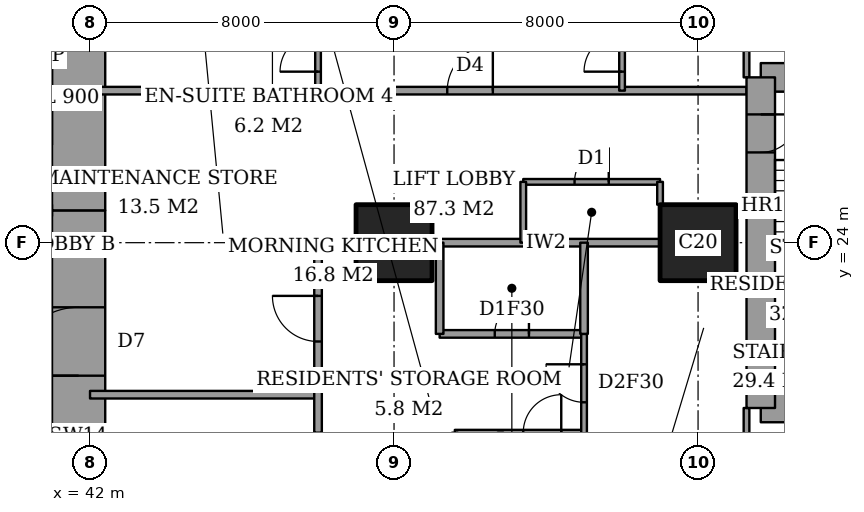
"""IFC4 building model, lengths in metres.
Left out: names, types, materials, properties, quantities, classifications, styles, units other than length and angle.
Written with IfcOpenShell. Run it as: python <this file> out.ifc"""

import sys

from ifc_helpers import new_model, si_unit, direction, frame, frame_2d, origin, origin_2d, place, context, subcontext, project, spatial, rectangle, extrude, element, fill, save


model = new_model("IFC4")
c1 = context("Model", 3, precision=1e-05, world=origin(), true_north=direction((0.0, 1.0)))
c2 = subcontext(c1, "Body", "Model", "MODEL_VIEW")
j1 = project(units=[si_unit("LENGTHUNIT", "METRE"), si_unit("PLANEANGLEUNIT", "RADIAN")], contexts=[c1])
p1 = place(None, origin())
s1 = spatial("IfcSite", under=j1, at=p1, CompositionType="ELEMENT")
p2 = place(p1, origin())
s2 = spatial("IfcBuilding", under=s1, at=p2, CompositionType="ELEMENT")
p3 = place(p2, frame((0.0, 0.0, 146.6)))
s3 = spatial("IfcBuildingStorey", under=s2, at=p3, CompositionType="ELEMENT", Elevation=146.6)
for number, where, z_axis, x_axis in (
    (1, (50.0, 24.0, 0.0), (0.0, 0.0, 1.0), (1.0, 0.0, 0.0)),
    (2, (58.0, 24.0, 0.0), (0.0, 0.0, 1.0), (1.0, 0.0, 0.0)),
):
    element("IfcColumn", number, at=place(p3, frame(where, z_axis=z_axis, x_axis=x_axis)), inside=s3, PredefinedType="COLUMN", context=c2, shape_type="SweptSolid", body=[
        extrude(rectangle(XDim=2.0, YDim=2.0, at=origin_2d()), origin(), (0.0, 0.0, 1.0), 3.6),
    ])
p4 = place(p3, frame((41.7, 13.0, 0.0), z_axis=(0.0, 0.0, 1.0), x_axis=(0.0, 1.0, 0.0)))
e3 = element("IfcWall", 3, at=p4, inside=s3, PredefinedType="SHEAR", context=c2, shape_type="SweptSolid", body=[
    extrude(rectangle(XDim=11.85, YDim=1.4, at=frame_2d((5.925, 0.0))), origin(), (0.0, 0.0, 1.0), 3.6),
])
p5 = place(p4, frame((7.5, 0.0, 0.0)))
e4 = element("IfcOpeningElement", 4, at=p5, cuts=e3, PredefinedType="OPENING", context=c2, shape_type="SweptSolid", body=[
    extrude(rectangle(XDim=1.8, YDim=2.4, at=frame_2d((0.9, 1.2))), frame((0.0, 0.71, 0.0), z_axis=(0.0, -1.0, 0.0), x_axis=(1.0, 0.0, 0.0)), (0.0, 0.0, 1.0), 1.42),
])
p6 = place(p3, frame((41.7, 24.85, 0.0), z_axis=(0.0, 0.0, 1.0), x_axis=(0.0, 1.0, 0.0)))
e5 = element("IfcWall", 5, at=p6, inside=s3, PredefinedType="SHEAR", context=c2, shape_type="SweptSolid", body=[
    extrude(rectangle(XDim=10.15, YDim=1.4, at=frame_2d((5.075, 0.0))), origin(), (0.0, 0.0, 1.0), 3.6),
])
for number, where, z_axis, x_axis in (
    (6, (59.65, 19.65, 0.0), (0.0, 0.0, 1.0), (1.0, 0.0, 0.0)),
    (7, (64.1, 28.35, 0.0), (0.0, 0.0, 1.0), (-1.0, 0.0, 0.0)),
):
    element("IfcWall", number, at=place(p3, frame(where, z_axis=z_axis, x_axis=x_axis)), inside=s3, PredefinedType="SHEAR", context=c2, shape_type="SweptSolid", body=[
        extrude(rectangle(XDim=4.45, YDim=0.75, at=frame_2d((2.225, 0.0))), origin(), (0.0, 0.0, 1.0), 3.6),
    ])
p7 = place(p3, frame((59.65, 28.35, 0.0), z_axis=(0.0, 0.0, 1.0), x_axis=(0.0, -1.0, 0.0)))
e8 = element("IfcWall", 8, at=p7, inside=s3, PredefinedType="SHEAR", context=c2, shape_type="SweptSolid", body=[
    extrude(rectangle(XDim=8.7, YDim=0.75, at=frame_2d((4.35, 0.0))), origin(), (0.0, 0.0, 1.0), 3.6),
])
p8 = place(p7, frame((0.975, 0.0, 0.0)))
e9 = element("IfcOpeningElement", 9, at=p8, cuts=e8, PredefinedType="OPENING", context=c2, shape_type="SweptSolid", body=[
    extrude(rectangle(XDim=1.0, YDim=2.1, at=frame_2d((0.5, 1.05))), frame((0.0, 0.385, 0.0), z_axis=(0.0, -1.0, 0.0), x_axis=(1.0, 0.0, 0.0)), (0.0, 0.0, 1.0), 0.77),
])
p9 = place(p3, frame((51.6, 19.0, 0.0), z_axis=(0.0, 0.0, 1.0), x_axis=(1.0, 0.0, 0.0)))
e10 = element("IfcWall", 10, at=p9, inside=s3, PredefinedType="PARTITIONING", context=c2, shape_type="SweptSolid", body=[
    extrude(rectangle(XDim=3.4, YDim=0.15, at=frame_2d((1.7, 0.0))), origin(), (0.0, 0.0, 1.0), 3.35),
])
p10 = place(p9, frame((1.8, 0.0, 0.0)))
e11 = element("IfcOpeningElement", 11, at=p10, cuts=e10, PredefinedType="OPENING", context=c2, shape_type="SweptSolid", body=[
    extrude(rectangle(XDim=1.0, YDim=2.1, at=frame_2d((0.5, 1.05))), frame((0.0, 0.085, 0.0), z_axis=(0.0, -1.0, 0.0), x_axis=(1.0, 0.0, 0.0)), (0.0, 0.0, 1.0), 0.17),
])
p11 = place(p3, frame((42.0, 20.0, 0.0), z_axis=(0.0, 0.0, 1.0), x_axis=(1.0, 0.0, 0.0)))
e12 = element("IfcWall", 12, at=p11, inside=s3, PredefinedType="PARTITIONING", context=c2, shape_type="SweptSolid", body=[
    extrude(rectangle(XDim=6.0, YDim=0.2, at=frame_2d((3.0, 0.0))), origin(), (0.0, 0.0, 1.0), 3.35),
])
p12 = place(p3, frame((51.2, 21.6, 0.0), z_axis=(0.0, 0.0, 1.0), x_axis=(1.0, 0.0, 0.0)))
e13 = element("IfcWall", 13, at=p12, inside=s3, PredefinedType="PARTITIONING", context=c2, shape_type="SweptSolid", body=[
    extrude(rectangle(XDim=3.8, YDim=0.2, at=frame_2d((1.9, 0.0))), origin(), (0.0, 0.0, 1.0), 3.35),
])
p13 = place(p12, frame((1.45, 0.0, 0.0)))
e14 = element("IfcOpeningElement", 14, at=p13, cuts=e13, PredefinedType="OPENING", context=c2, shape_type="SweptSolid", body=[
    extrude(rectangle(XDim=0.9, YDim=2.1, at=frame_2d((0.45, 1.05))), frame((0.0, 0.11, 0.0), z_axis=(0.0, -1.0, 0.0), x_axis=(1.0, 0.0, 0.0)), (0.0, 0.0, 1.0), 0.22),
])
p14 = place(p3, frame((48.0, 24.0, 0.0), z_axis=(0.0, 0.0, 1.0), x_axis=(1.0, 0.0, 0.0)))
e15 = element("IfcWall", 15, at=p14, inside=s3, PredefinedType="PARTITIONING", context=c2, shape_type="SweptSolid", body=[
    extrude(rectangle(XDim=1.0, YDim=0.2, at=frame_2d((0.5, 0.0))), origin(), (0.0, 0.0, 1.0), 3.35),
])
p15 = place(p3, frame((51.0, 24.0, 0.0), z_axis=(0.0, 0.0, 1.0), x_axis=(1.0, 0.0, 0.0)))
e16 = element("IfcWall", 16, at=p15, inside=s3, PredefinedType="PARTITIONING", context=c2, shape_type="SweptSolid", body=[
    extrude(rectangle(XDim=6.0, YDim=0.2, at=frame_2d((3.0, 0.0))), origin(), (0.0, 0.0, 1.0), 3.35),
])
p16 = place(p3, frame((53.4, 25.6, 0.0), z_axis=(0.0, 0.0, 1.0), x_axis=(1.0, 0.0, 0.0)))
e17 = element("IfcWall", 17, at=p16, inside=s3, PredefinedType="PARTITIONING", context=c2, shape_type="SweptSolid", body=[
    extrude(rectangle(XDim=3.6, YDim=0.15, at=frame_2d((1.8, 0.0))), origin(), (0.0, 0.0, 1.0), 3.35),
])
p17 = place(p16, frame((1.35, 0.0, 0.0)))
e18 = element("IfcOpeningElement", 18, at=p17, cuts=e17, PredefinedType="OPENING", context=c2, shape_type="SweptSolid", body=[
    extrude(rectangle(XDim=0.9, YDim=2.1, at=frame_2d((0.45, 1.05))), frame((0.0, 0.085, 0.0), z_axis=(0.0, -1.0, 0.0), x_axis=(1.0, 0.0, 0.0)), (0.0, 0.0, 1.0), 0.17),
])
p18 = place(p3, frame((42.0, 28.0, 0.0), z_axis=(0.0, 0.0, 1.0), x_axis=(1.0, 0.0, 0.0)))
e19 = element("IfcWall", 19, at=p18, inside=s3, PredefinedType="PARTITIONING", context=c2, shape_type="SweptSolid", body=[
    extrude(rectangle(XDim=17.275, YDim=0.2, at=frame_2d((8.637, 0.0))), origin(), (0.0, 0.0, 1.0), 3.35),
])
p19 = place(p18, frame((9.4, 0.0, 0.0)))
e20 = element("IfcOpeningElement", 20, at=p19, cuts=e19, PredefinedType="OPENING", context=c2, shape_type="SweptSolid", body=[
    extrude(rectangle(XDim=1.2, YDim=2.4, at=frame_2d((0.6, 1.2))), frame((0.0, 0.11, 0.0), z_axis=(0.0, -1.0, 0.0), x_axis=(1.0, 0.0, 0.0)), (0.0, 0.0, 1.0), 0.22),
])
p20 = place(p3, frame((48.0, 19.0, 0.0), z_axis=(0.0, 0.0, 1.0), x_axis=(0.0, 1.0, 0.0)))
e21 = element("IfcWall", 21, at=p20, inside=s3, PredefinedType="PARTITIONING", context=c2, shape_type="SweptSolid", body=[
    extrude(rectangle(XDim=5.0, YDim=0.2, at=frame_2d((2.5, 0.0))), origin(), (0.0, 0.0, 1.0), 3.35),
])
p21 = place(p20, frame((2.4, 0.0, 0.0)))
e22 = element("IfcOpeningElement", 22, at=p21, cuts=e21, PredefinedType="OPENING", context=c2, shape_type="SweptSolid", body=[
    extrude(rectangle(XDim=1.2, YDim=2.4, at=frame_2d((0.6, 1.2))), frame((0.0, 0.11, 0.0), z_axis=(0.0, -1.0, 0.0), x_axis=(1.0, 0.0, 0.0)), (0.0, 0.0, 1.0), 0.22),
])
p22 = place(p3, frame((48.0, 28.0, 0.0), z_axis=(0.0, 0.0, 1.0), x_axis=(0.0, 1.0, 0.0)))
e23 = element("IfcWall", 23, at=p22, inside=s3, PredefinedType="PARTITIONING", context=c2, shape_type="SweptSolid", body=[
    extrude(rectangle(XDim=9.2, YDim=0.15, at=frame_2d((4.6, 0.0))), origin(), (0.0, 0.0, 1.0), 3.35),
])
p23 = place(p22, frame((0.5, 0.0, 0.0)))
e24 = element("IfcOpeningElement", 24, at=p23, cuts=e23, PredefinedType="OPENING", context=c2, shape_type="SweptSolid", body=[
    extrude(rectangle(XDim=1.0, YDim=2.1, at=frame_2d((0.5, 1.05))), frame((0.0, 0.085, 0.0), z_axis=(0.0, -1.0, 0.0), x_axis=(1.0, 0.0, 0.0)), (0.0, 0.0, 1.0), 0.17),
])
p24 = place(p3, frame((51.2, 21.6, 0.0), z_axis=(0.0, 0.0, 1.0), x_axis=(0.0, 1.0, 0.0)))
e25 = element("IfcWall", 25, at=p24, inside=s3, PredefinedType="PARTITIONING", context=c2, shape_type="SweptSolid", body=[
    extrude(rectangle(XDim=2.4, YDim=0.2, at=frame_2d((1.2, 0.0))), origin(), (0.0, 0.0, 1.0), 3.35),
])
p25 = place(p3, frame((51.6, 16.05, 0.0), z_axis=(0.0, 0.0, 1.0), x_axis=(0.0, 1.0, 0.0)))
e26 = element("IfcWall", 26, at=p25, inside=s3, PredefinedType="PARTITIONING", context=c2, shape_type="SweptSolid", body=[
    extrude(rectangle(XDim=2.95, YDim=0.15, at=frame_2d((1.475, 0.0))), origin(), (0.0, 0.0, 1.0), 3.35),
])
p26 = place(p3, frame((53.4, 24.0, 0.0), z_axis=(0.0, 0.0, 1.0), x_axis=(0.0, 1.0, 0.0)))
e27 = element("IfcWall", 27, at=p26, inside=s3, PredefinedType="PARTITIONING", context=c2, shape_type="SweptSolid", body=[
    extrude(rectangle(XDim=1.6, YDim=0.15, at=frame_2d((0.8, 0.0))), origin(), (0.0, 0.0, 1.0), 3.35),
])
p27 = place(p3, frame((55.0, 21.6, 0.0), z_axis=(0.0, 0.0, 1.0), x_axis=(0.0, 1.0, 0.0)))
e28 = element("IfcWall", 28, at=p27, inside=s3, PredefinedType="PARTITIONING", context=c2, shape_type="SweptSolid", body=[
    extrude(rectangle(XDim=2.4, YDim=0.2, at=frame_2d((1.2, 0.0))), origin(), (0.0, 0.0, 1.0), 3.35),
])
p28 = place(p3, frame((55.0, 10.6, 0.0), z_axis=(0.0, 0.0, 1.0), x_axis=(0.0, 1.0, 0.0)))
e29 = element("IfcWall", 29, at=p28, inside=s3, PredefinedType="PARTITIONING", context=c2, shape_type="SweptSolid", body=[
    extrude(rectangle(XDim=11.0, YDim=0.15, at=frame_2d((5.5, 0.0))), origin(), (0.0, 0.0, 1.0), 3.35),
])
p29 = place(p28, frame((9.2, 0.0, 0.0)))
e30 = element("IfcOpeningElement", 30, at=p29, cuts=e29, PredefinedType="OPENING", context=c2, shape_type="SweptSolid", body=[
    extrude(rectangle(XDim=1.0, YDim=2.1, at=frame_2d((0.5, 1.05))), frame((0.0, 0.085, 0.0), z_axis=(0.0, -1.0, 0.0), x_axis=(1.0, 0.0, 0.0)), (0.0, 0.0, 1.0), 0.17),
])
p30 = place(p3, frame((56.0, 28.0, 0.0), z_axis=(0.0, 0.0, 1.0), x_axis=(0.0, 1.0, 0.0)))
e31 = element("IfcWall", 31, at=p30, inside=s3, PredefinedType="PARTITIONING", context=c2, shape_type="SweptSolid", body=[
    extrude(rectangle(XDim=9.2, YDim=0.15, at=frame_2d((4.6, 0.0))), origin(), (0.0, 0.0, 1.0), 3.35),
])
p31 = place(p30, frame((0.5, 0.0, 0.0)))
e32 = element("IfcOpeningElement", 32, at=p31, cuts=e31, PredefinedType="OPENING", context=c2, shape_type="SweptSolid", body=[
    extrude(rectangle(XDim=1.0, YDim=2.1, at=frame_2d((0.5, 1.05))), frame((0.0, 0.085, 0.0), z_axis=(0.0, -1.0, 0.0), x_axis=(1.0, 0.0, 0.0)), (0.0, 0.0, 1.0), 0.17),
])
p32 = place(p3, frame((57.0, 25.0, 0.0), z_axis=(0.0, 0.0, 1.0), x_axis=(0.0, 1.0, 0.0)))
e33 = element("IfcWall", 33, at=p32, inside=s3, PredefinedType="PARTITIONING", context=c2, shape_type="SweptSolid", body=[
    extrude(rectangle(XDim=0.6, YDim=0.15, at=frame_2d((0.3, 0.0))), origin(), (0.0, 0.0, 1.0), 3.35),
])
p33 = place(p3, frame((59.275, 17.2, 0.0), z_axis=(0.0, 0.0, 1.0), x_axis=(0.0, 1.0, 0.0)))
e34 = element("IfcWall", 34, at=p33, inside=s3, PredefinedType="PARTITIONING", context=c2, shape_type="SweptSolid", body=[
    extrude(rectangle(XDim=2.45, YDim=0.15, at=frame_2d((1.225, 0.0))), origin(), (0.0, 0.0, 1.0), 3.35),
])
p34 = place(p33, frame((0.538, 0.0, 0.0)))
e35 = element("IfcOpeningElement", 35, at=p34, cuts=e34, PredefinedType="OPENING", context=c2, shape_type="SweptSolid", body=[
    extrude(rectangle(XDim=1.0, YDim=2.1, at=frame_2d((0.5, 1.05))), frame((0.0, 0.085, 0.0), z_axis=(0.0, -1.0, 0.0), x_axis=(1.0, 0.0, 0.0)), (0.0, 0.0, 1.0), 0.17),
])
p35 = place(p3, frame((59.275, 28.35, 0.0), z_axis=(0.0, 0.0, 1.0), x_axis=(0.0, 1.0, 0.0)))
e36 = element("IfcWall", 36, at=p35, inside=s3, PredefinedType="PARTITIONING", context=c2, shape_type="SweptSolid", body=[
    extrude(rectangle(XDim=2.45, YDim=0.15, at=frame_2d((1.225, 0.0))), origin(), (0.0, 0.0, 1.0), 3.35),
])
p36 = place(p35, frame((0.913, 0.0, 0.0)))
e37 = element("IfcOpeningElement", 37, at=p36, cuts=e36, PredefinedType="OPENING", context=c2, shape_type="SweptSolid", body=[
    extrude(rectangle(XDim=1.0, YDim=2.1, at=frame_2d((0.5, 1.05))), frame((0.0, 0.085, 0.0), z_axis=(0.0, -1.0, 0.0), x_axis=(1.0, 0.0, 0.0)), (0.0, 0.0, 1.0), 0.17),
])
p37 = place(p29, origin())
e38 = element("IfcDoor", 38, at=p37, inside=s3, OperationType="SINGLE_SWING_LEFT", PredefinedType="DOOR", context=c2, shape_type="SweptSolid", body=[
    extrude(rectangle(XDim=1.0, YDim=2.1, at=frame_2d((0.5, 1.05))), frame((0.0, 0.025, 0.0), z_axis=(0.0, -1.0, 0.0), x_axis=(1.0, 0.0, 0.0)), (0.0, 0.0, 1.0), 0.05),
])
fill(e30, e38)
p38 = place(p13, origin())
e39 = element("IfcDoor", 39, at=p38, inside=s3, OperationType="SINGLE_SWING_LEFT", PredefinedType="DOOR", context=c2, shape_type="SweptSolid", body=[
    extrude(rectangle(XDim=0.9, YDim=2.1, at=frame_2d((0.45, 1.05))), frame((0.0, 0.025, 0.0), z_axis=(0.0, -1.0, 0.0), x_axis=(1.0, 0.0, 0.0)), (0.0, 0.0, 1.0), 0.05),
])
fill(e14, e39)
p39 = place(p21, origin())
e40 = element("IfcDoor", 40, at=p39, inside=s3, OperationType="SINGLE_SWING_LEFT", PredefinedType="DOOR", context=c2, shape_type="SweptSolid", body=[
    extrude(rectangle(XDim=1.2, YDim=2.4, at=frame_2d((0.6, 1.2))), frame((0.0, 0.025, 0.0), z_axis=(0.0, -1.0, 0.0), x_axis=(1.0, 0.0, 0.0)), (0.0, 0.0, 1.0), 0.05),
])
fill(e22, e40)
p40 = place(p10, origin())
e41 = element("IfcDoor", 41, at=p40, inside=s3, OperationType="SINGLE_SWING_LEFT", PredefinedType="DOOR", context=c2, shape_type="SweptSolid", body=[
    extrude(rectangle(XDim=1.0, YDim=2.1, at=frame_2d((0.5, 1.05))), frame((0.0, 0.025, 0.0), z_axis=(0.0, -1.0, 0.0), x_axis=(1.0, 0.0, 0.0)), (0.0, 0.0, 1.0), 0.05),
])
fill(e11, e41)
p41 = place(p31, origin())
e42 = element("IfcDoor", 42, at=p41, inside=s3, OperationType="SINGLE_SWING_RIGHT", PredefinedType="DOOR", context=c2, shape_type="SweptSolid", body=[
    extrude(rectangle(XDim=1.0, YDim=2.1, at=frame_2d((0.5, 1.05))), frame((0.0, 0.025, 0.0), z_axis=(0.0, -1.0, 0.0), x_axis=(1.0, 0.0, 0.0)), (0.0, 0.0, 1.0), 0.05),
])
fill(e32, e42)
p42 = place(p19, origin())
e43 = element("IfcDoor", 43, at=p42, inside=s3, OperationType="SINGLE_SWING_LEFT", PredefinedType="DOOR", context=c2, shape_type="SweptSolid", body=[
    extrude(rectangle(XDim=1.2, YDim=2.4, at=frame_2d((0.6, 1.2))), frame((0.0, 0.025, 0.0), z_axis=(0.0, -1.0, 0.0), x_axis=(1.0, 0.0, 0.0)), (0.0, 0.0, 1.0), 0.05),
])
fill(e20, e43)
p43 = place(p23, origin())
e44 = element("IfcDoor", 44, at=p43, inside=s3, OperationType="SINGLE_SWING_RIGHT", PredefinedType="DOOR", context=c2, shape_type="SweptSolid", body=[
    extrude(rectangle(XDim=1.0, YDim=2.1, at=frame_2d((0.5, 1.05))), frame((0.0, 0.025, 0.0), z_axis=(0.0, -1.0, 0.0), x_axis=(1.0, 0.0, 0.0)), (0.0, 0.0, 1.0), 0.05),
])
fill(e24, e44)
p44 = place(p17, origin())
e45 = element("IfcDoor", 45, at=p44, inside=s3, OperationType="SINGLE_SWING_LEFT", PredefinedType="DOOR", context=c2, shape_type="SweptSolid", body=[
    extrude(rectangle(XDim=0.9, YDim=2.1, at=frame_2d((0.45, 1.05))), frame((0.0, 0.025, 0.0), z_axis=(0.0, -1.0, 0.0), x_axis=(1.0, 0.0, 0.0)), (0.0, 0.0, 1.0), 0.05),
])
fill(e18, e45)
p45 = place(p5, origin())
e46 = element("IfcDoor", 46, at=p45, inside=s3, OperationType="DOUBLE_DOOR_DOUBLE_SWING", PredefinedType="DOOR", context=c2, shape_type="SweptSolid", body=[
    extrude(rectangle(XDim=1.8, YDim=2.4, at=frame_2d((0.9, 1.2))), frame((0.0, 0.025, 0.0), z_axis=(0.0, -1.0, 0.0), x_axis=(1.0, 0.0, 0.0)), (0.0, 0.0, 1.0), 0.05),
])
fill(e4, e46)
p46 = place(p8, origin())
e47 = element("IfcDoor", 47, at=p46, inside=s3, OperationType="SINGLE_SWING_RIGHT", PredefinedType="DOOR", context=c2, shape_type="SweptSolid", body=[
    extrude(rectangle(XDim=1.0, YDim=2.1, at=frame_2d((0.5, 1.05))), frame((0.0, 0.025, 0.0), z_axis=(0.0, -1.0, 0.0), x_axis=(1.0, 0.0, 0.0)), (0.0, 0.0, 1.0), 0.05),
])
fill(e9, e47)
save(model, sys.argv[1])
